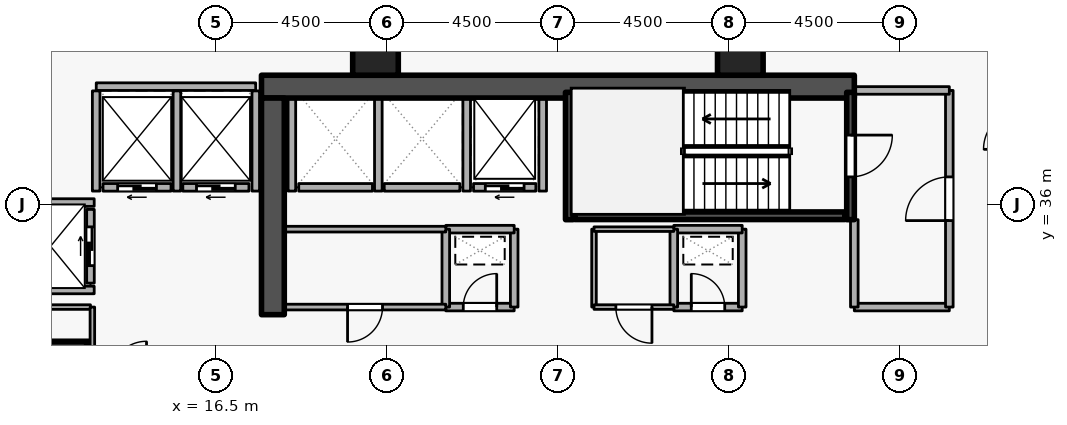
"""IFC4 building model, lengths in metres.
Left out: names, types, materials, properties, quantities, classifications, styles, units other than length and angle.
Written with IfcOpenShell. Run it as: python <this file> out.ifc"""

import sys

from ifc_helpers import new_model, si_unit, direction, frame, frame_2d, origin, origin_2d, place, context, subcontext, project, spatial, rectangle, extrude, element, fill, save


model = new_model("IFC4")
c1 = context("Model", 3, precision=1e-05, world=origin(), true_north=direction((0.0, 1.0)))
c2 = subcontext(c1, "Body", "Model", "MODEL_VIEW")
j1 = project(units=[si_unit("LENGTHUNIT", "METRE"), si_unit("PLANEANGLEUNIT", "RADIAN")], contexts=[c1])
p1 = place(None, origin())
s1 = spatial("IfcSite", under=j1, at=p1, CompositionType="ELEMENT")
p2 = place(p1, origin())
s2 = spatial("IfcBuilding", under=s1, at=p2, CompositionType="ELEMENT")
p3 = place(p2, frame((0.0, 0.0, 90.9)))
s3 = spatial("IfcBuildingStorey", under=s2, at=p3, CompositionType="ELEMENT", Elevation=90.9)
p4 = place(p3, frame((17.7, 39.1, 0.0), z_axis=(0.0, 0.0, 1.0), x_axis=(1.0, 0.0, 0.0)))
e1 = element("IfcWall", 1, at=p4, inside=s3, PredefinedType="SHEAR", context=c2, shape_type="SweptSolid", body=[
    extrude(rectangle(XDim=15.6, YDim=0.6, at=frame_2d((7.8, 0.0))), origin(), (0.0, 0.0, 1.0), 3.6),
])
p5 = place(p3, frame((18.0, 33.1, 0.0), z_axis=(0.0, 0.0, 1.0), x_axis=(0.0, 1.0, 0.0)))
e2 = element("IfcWall", 2, at=p5, inside=s3, PredefinedType="SHEAR", context=c2, shape_type="SweptSolid", body=[
    extrude(rectangle(XDim=5.7, YDim=0.6, at=frame_2d((2.85, 0.0))), origin(), (0.0, 0.0, 1.0), 3.6),
])
for number, where, z_axis, x_axis in (
    (3, (12.5, 31.8, 0.0), (0.0, 0.0, 1.0), (1.0, 0.0, 0.0)),
    (4, (20.7, 40.0, 0.0), (0.0, 0.0, 1.0), (1.0, 0.0, 0.0)),
    (5, (30.3, 40.0, 0.0), (0.0, 0.0, 1.0), (1.0, 0.0, 0.0)),
):
    element("IfcColumn", number, at=place(p3, frame(where, z_axis=z_axis, x_axis=x_axis)), inside=s3, PredefinedType="COLUMN", context=c2, shape_type="SweptSolid", body=[
        extrude(rectangle(XDim=1.2, YDim=1.2, at=origin_2d()), origin(), (0.0, 0.0, 1.0), 3.6),
    ])
p6 = place(p3, frame((24.92, 36.45, 0.0), z_axis=(0.0, 0.0, 1.0), x_axis=(-1.0, 0.0, 0.0)))
e6 = element("IfcWall", 6, at=p6, inside=s3, PredefinedType="STANDARD", context=c2, shape_type="SweptSolid", body=[
    extrude(rectangle(XDim=1.64, YDim=0.2, at=frame_2d((0.82, 0.0))), origin(), (0.0, 0.0, 1.0), 3.34),
])
p7 = place(p6, frame((0.31, 0.0, 0.0)))
e7 = element("IfcOpeningElement", 7, at=p7, cuts=e6, PredefinedType="OPENING", context=c2, shape_type="SweptSolid", body=[
    extrude(rectangle(XDim=1.02, YDim=2.06, at=frame_2d((0.51, 1.03))), frame((0.0, 0.11, 0.0), z_axis=(0.0, -1.0, 0.0), x_axis=(1.0, 0.0, 0.0)), (0.0, 0.0, 1.0), 0.22),
])
p8 = place(p3, frame((22.92, 36.45, 0.0), z_axis=(0.0, 0.0, 1.0), x_axis=(-1.0, 0.0, 0.0)))
e8 = element("IfcWall", 8, at=p8, inside=s3, PredefinedType="STANDARD", context=c2, shape_type="SweptSolid", body=[
    extrude(rectangle(XDim=1.99, YDim=0.2, at=frame_2d((0.995, 0.0))), origin(), (0.0, 0.0, 1.0), 3.34),
])
p9 = place(p3, frame((20.62, 36.45, 0.0), z_axis=(0.0, 0.0, 1.0), x_axis=(-1.0, 0.0, 0.0)))
e9 = element("IfcWall", 9, at=p9, inside=s3, PredefinedType="STANDARD", context=c2, shape_type="SweptSolid", body=[
    extrude(rectangle(XDim=1.94, YDim=0.2, at=frame_2d((0.97, 0.0))), origin(), (0.0, 0.0, 1.0), 3.34),
])
p10 = place(p3, frame((17.37, 36.45, 0.0), z_axis=(0.0, 0.0, 1.0), x_axis=(-1.0, 0.0, 0.0)))
e10 = element("IfcWall", 10, at=p10, inside=s3, PredefinedType="STANDARD", context=c2, shape_type="SweptSolid", body=[
    extrude(rectangle(XDim=1.74, YDim=0.2, at=frame_2d((0.87, 0.0))), origin(), (0.0, 0.0, 1.0), 3.34),
])
p11 = place(p10, frame((0.36, 0.0, 0.0)))
e11 = element("IfcOpeningElement", 11, at=p11, cuts=e10, PredefinedType="OPENING", context=c2, shape_type="SweptSolid", body=[
    extrude(rectangle(XDim=1.02, YDim=2.06, at=frame_2d((0.51, 1.03))), frame((0.0, 0.11, 0.0), z_axis=(0.0, -1.0, 0.0), x_axis=(1.0, 0.0, 0.0)), (0.0, 0.0, 1.0), 0.22),
])
p12 = place(p3, frame((15.32, 36.45, 0.0), z_axis=(0.0, 0.0, 1.0), x_axis=(-1.0, 0.0, 0.0)))
e12 = element("IfcWall", 12, at=p12, inside=s3, PredefinedType="STANDARD", context=c2, shape_type="SweptSolid", body=[
    extrude(rectangle(XDim=1.79, YDim=0.2, at=frame_2d((0.895, 0.0))), origin(), (0.0, 0.0, 1.0), 3.34),
])
p13 = place(p12, frame((0.385, 0.0, 0.0)))
e13 = element("IfcOpeningElement", 13, at=p13, cuts=e12, PredefinedType="OPENING", context=c2, shape_type="SweptSolid", body=[
    extrude(rectangle(XDim=1.02, YDim=2.06, at=frame_2d((0.51, 1.03))), frame((0.0, 0.11, 0.0), z_axis=(0.0, -1.0, 0.0), x_axis=(1.0, 0.0, 0.0)), (0.0, 0.0, 1.0), 0.22),
])
p14 = place(p3, frame((13.2, 33.93, 0.0), z_axis=(0.0, 0.0, 1.0), x_axis=(0.0, 1.0, 0.0)))
e14 = element("IfcWall", 14, at=p14, inside=s3, PredefinedType="STANDARD", context=c2, shape_type="SweptSolid", body=[
    extrude(rectangle(XDim=1.94, YDim=0.2, at=frame_2d((0.97, 0.0))), origin(), (0.0, 0.0, 1.0), 3.34),
])
p15 = place(p14, frame((0.46, 0.0, 0.0)))
e15 = element("IfcOpeningElement", 15, at=p15, cuts=e14, PredefinedType="OPENING", context=c2, shape_type="SweptSolid", body=[
    extrude(rectangle(XDim=1.02, YDim=2.06, at=frame_2d((0.51, 1.03))), frame((0.0, 0.11, 0.0), z_axis=(0.0, -1.0, 0.0), x_axis=(1.0, 0.0, 0.0)), (0.0, 0.0, 1.0), 0.22),
])
for number, where, z_axis, x_axis in (
    (16, (25.1, 36.352, 0.0), (0.0, 0.0, 1.0), (0.0, 1.0, 0.0)),
    (17, (23.1, 36.352, 0.0), (0.0, 0.0, 1.0), (0.0, 1.0, 0.0)),
    (18, (20.775, 36.352, 0.0), (0.0, 0.0, 1.0), (0.0, 1.0, 0.0)),
    (19, (18.5, 36.352, 0.0), (0.0, 0.0, 1.0), (0.0, 1.0, 0.0)),
):
    element("IfcWall", number, at=place(p3, frame(where, z_axis=z_axis, x_axis=x_axis)), inside=s3, PredefinedType="STANDARD", context=c2, shape_type="SweptSolid", body=[
        extrude(rectangle(XDim=2.436, YDim=0.2, at=frame_2d((1.218, 0.0))), origin(), (0.0, 0.0, 1.0), 3.34),
    ])
p16 = place(p3, frame((13.352, 39.1, 0.0), z_axis=(0.0, 0.0, 1.0), x_axis=(1.0, 0.0, 0.0)))
e20 = element("IfcWall", 20, at=p16, inside=s3, PredefinedType="STANDARD", context=c2, shape_type="SweptSolid", body=[
    extrude(rectangle(XDim=4.196, YDim=0.2, at=frame_2d((2.098, 0.0))), origin(), (0.0, 0.0, 1.0), 3.34),
])
p17 = place(p3, frame((17.55, 36.352, 0.0), z_axis=(0.0, 0.0, 1.0), x_axis=(0.0, 1.0, 0.0)))
e21 = element("IfcWall", 21, at=p17, inside=s3, PredefinedType="STANDARD", context=c2, shape_type="SweptSolid", body=[
    extrude(rectangle(XDim=2.636, YDim=0.2, at=frame_2d((1.318, 0.0))), origin(), (0.0, 0.0, 1.0), 2.545),
])
for number, where, z_axis, x_axis in (
    (22, (15.475, 36.352, 0.0), (0.0, 0.0, 1.0), (0.0, 1.0, 0.0)),
    (23, (13.35, 36.352, 0.0), (0.0, 0.0, 1.0), (0.0, 1.0, 0.0)),
):
    element("IfcWall", number, at=place(p3, frame(where, z_axis=z_axis, x_axis=x_axis)), inside=s3, PredefinedType="STANDARD", context=c2, shape_type="SweptSolid", body=[
        extrude(rectangle(XDim=2.636, YDim=0.2, at=frame_2d((1.318, 0.0))), origin(), (0.0, 0.0, 1.0), 3.34),
    ])
for number, where, z_axis, x_axis in (
    (24, (11.002, 36.05, 0.0), (0.0, 0.0, 1.0), (1.0, 0.0, 0.0)),
    (25, (11.002, 33.75, 0.0), (0.0, 0.0, 1.0), (1.0, 0.0, 0.0)),
):
    element("IfcWall", number, at=place(p3, frame(where, z_axis=z_axis, x_axis=x_axis)), inside=s3, PredefinedType="STANDARD", context=c2, shape_type="SweptSolid", body=[
        extrude(rectangle(XDim=2.296, YDim=0.2, at=frame_2d((1.148, 0.0))), origin(), (0.0, 0.0, 1.0), 3.34),
    ])
p18 = place(p3, frame((33.2, 38.95, 0.0), z_axis=(0.0, 0.0, 1.0), x_axis=(0.0, -1.0, 0.0)))
e26 = element("IfcWall", 26, at=p18, inside=s3, PredefinedType="SHEAR", context=c2, shape_type="SweptSolid", body=[
    extrude(rectangle(XDim=3.35, YDim=0.2, at=frame_2d((1.675, 0.0))), origin(), (0.0, 0.0, 1.0), 3.6),
])
p19 = place(p18, frame((1.125, 0.0, 0.0)))
e27 = element("IfcOpeningElement", 27, at=p19, cuts=e26, PredefinedType="OPENING", context=c2, shape_type="SweptSolid", body=[
    extrude(rectangle(XDim=1.1, YDim=2.1, at=frame_2d((0.55, 1.05))), frame((0.0, 0.11, 0.0), z_axis=(0.0, -1.0, 0.0), x_axis=(1.0, 0.0, 0.0)), (0.0, 0.0, 1.0), 0.22),
])
p20 = place(p3, frame((25.8, 35.6, 0.0), z_axis=(0.0, 0.0, 1.0), x_axis=(0.0, 1.0, 0.0)))
e28 = element("IfcWall", 28, at=p20, inside=s3, PredefinedType="SHEAR", context=c2, shape_type="SweptSolid", body=[
    extrude(rectangle(XDim=3.35, YDim=0.2, at=frame_2d((1.675, 0.0))), origin(), (0.0, 0.0, 1.0), 3.6),
])
p21 = place(p3, frame((25.95, 35.703, 0.0), z_axis=(0.0, 0.0, 1.0), x_axis=(1.0, 0.0, 0.0)))
e29 = element("IfcWall", 29, at=p21, inside=s3, PredefinedType="SHEAR", context=c2, shape_type="SweptSolid", body=[
    extrude(rectangle(XDim=7.1, YDim=0.2, at=frame_2d((3.55, 0.0))), origin(), (0.0, 0.0, 1.0), 3.6),
])
p22 = place(p3, frame((33.3, 33.3, 0.0), z_axis=(0.0, 0.0, 1.0), x_axis=(1.0, 0.0, 0.0)))
e30 = element("IfcWall", 30, at=p22, inside=s3, PredefinedType="STANDARD", context=c2, shape_type="SweptSolid", body=[
    extrude(rectangle(XDim=2.5, YDim=0.2, at=frame_2d((1.25, 0.0))), origin(), (0.0, 0.0, 1.0), 3.34),
])
p23 = place(p3, frame((35.8, 33.3, 0.0), z_axis=(0.0, 0.0, 1.0), x_axis=(0.0, 1.0, 0.0)))
e31 = element("IfcWall", 31, at=p23, inside=s3, PredefinedType="STANDARD", context=c2, shape_type="SweptSolid", body=[
    extrude(rectangle(XDim=5.7, YDim=0.2, at=frame_2d((2.85, 0.0))), origin(), (0.0, 0.0, 1.0), 3.34),
])
p24 = place(p23, frame((2.275, 0.0, 0.0)))
e32 = element("IfcOpeningElement", 32, at=p24, cuts=e31, PredefinedType="OPENING", context=c2, shape_type="SweptSolid", body=[
    extrude(rectangle(XDim=1.15, YDim=2.1, at=frame_2d((0.575, 1.05))), frame((0.0, 0.11, 0.0), z_axis=(0.0, -1.0, 0.0), x_axis=(1.0, 0.0, 0.0)), (0.0, 0.0, 1.0), 0.22),
])
p25 = place(p3, frame((35.8, 39.0, 0.0), z_axis=(0.0, 0.0, 1.0), x_axis=(-1.0, 0.0, 0.0)))
e33 = element("IfcWall", 33, at=p25, inside=s3, PredefinedType="STANDARD", context=c2, shape_type="SweptSolid", body=[
    extrude(rectangle(XDim=2.5, YDim=0.2, at=frame_2d((1.25, 0.0))), origin(), (0.0, 0.0, 1.0), 3.34),
])
p26 = place(p3, frame((33.3, 35.6, 0.0), z_axis=(0.0, 0.0, 1.0), x_axis=(0.0, -1.0, 0.0)))
e34 = element("IfcWall", 34, at=p26, inside=s3, PredefinedType="STANDARD", context=c2, shape_type="SweptSolid", body=[
    extrude(rectangle(XDim=2.3, YDim=0.2, at=frame_2d((1.15, 0.0))), origin(), (0.0, 0.0, 1.0), 2.545),
])
p27 = place(p3, frame((22.55, 33.3, 0.0), z_axis=(0.0, 0.0, 1.0), x_axis=(1.0, 0.0, 0.0)))
e35 = element("IfcWall", 35, at=p27, inside=s3, PredefinedType="STANDARD", context=c2, shape_type="SweptSolid", body=[
    extrude(rectangle(XDim=1.8, YDim=0.2, at=frame_2d((0.9, 0.0))), origin(), (0.0, 0.0, 1.0), 3.34),
])
p28 = place(p27, frame((0.46, 0.0, 0.0)))
e36 = element("IfcOpeningElement", 36, at=p28, cuts=e35, PredefinedType="OPENING", context=c2, shape_type="SweptSolid", body=[
    extrude(rectangle(XDim=0.88, YDim=2.04, at=frame_2d((0.44, 1.02))), frame((0.0, 0.11, 0.0), z_axis=(0.0, -1.0, 0.0), x_axis=(1.0, 0.0, 0.0)), (0.0, 0.0, 1.0), 0.22),
])
p29 = place(p3, frame((24.35, 33.3, 0.0), z_axis=(0.0, 0.0, 1.0), x_axis=(0.0, 1.0, 0.0)))
e37 = element("IfcWall", 37, at=p29, inside=s3, PredefinedType="STANDARD", context=c2, shape_type="SweptSolid", body=[
    extrude(rectangle(XDim=2.05, YDim=0.2, at=frame_2d((1.025, 0.0))), origin(), (0.0, 0.0, 1.0), 3.34),
])
p30 = place(p3, frame((24.35, 35.35, 0.0), z_axis=(0.0, 0.0, 1.0), x_axis=(-1.0, 0.0, 0.0)))
e38 = element("IfcWall", 38, at=p30, inside=s3, PredefinedType="STANDARD", context=c2, shape_type="SweptSolid", body=[
    extrude(rectangle(XDim=1.8, YDim=0.2, at=frame_2d((0.9, 0.0))), origin(), (0.0, 0.0, 1.0), 3.34),
])
p31 = place(p3, frame((22.55, 35.35, 0.0), z_axis=(0.0, 0.0, 1.0), x_axis=(0.0, -1.0, 0.0)))
e39 = element("IfcWall", 39, at=p31, inside=s3, PredefinedType="STANDARD", context=c2, shape_type="SweptSolid", body=[
    extrude(rectangle(XDim=2.05, YDim=0.2, at=frame_2d((1.025, 0.0))), origin(), (0.0, 0.0, 1.0), 3.34),
])
p32 = place(p3, frame((28.55, 33.3, 0.0), z_axis=(0.0, 0.0, 1.0), x_axis=(1.0, 0.0, 0.0)))
e40 = element("IfcWall", 40, at=p32, inside=s3, PredefinedType="STANDARD", context=c2, shape_type="SweptSolid", body=[
    extrude(rectangle(XDim=1.8, YDim=0.2, at=frame_2d((0.9, 0.0))), origin(), (0.0, 0.0, 1.0), 3.34),
])
p33 = place(p32, frame((0.46, 0.0, 0.0)))
e41 = element("IfcOpeningElement", 41, at=p33, cuts=e40, PredefinedType="OPENING", context=c2, shape_type="SweptSolid", body=[
    extrude(rectangle(XDim=0.88, YDim=2.04, at=frame_2d((0.44, 1.02))), frame((0.0, 0.11, 0.0), z_axis=(0.0, -1.0, 0.0), x_axis=(1.0, 0.0, 0.0)), (0.0, 0.0, 1.0), 0.22),
])
p34 = place(p3, frame((30.35, 33.3, 0.0), z_axis=(0.0, 0.0, 1.0), x_axis=(0.0, 1.0, 0.0)))
e42 = element("IfcWall", 42, at=p34, inside=s3, PredefinedType="STANDARD", context=c2, shape_type="SweptSolid", body=[
    extrude(rectangle(XDim=2.05, YDim=0.2, at=frame_2d((1.025, 0.0))), origin(), (0.0, 0.0, 1.0), 3.34),
])
p35 = place(p3, frame((30.35, 35.35, 0.0), z_axis=(0.0, 0.0, 1.0), x_axis=(-1.0, 0.0, 0.0)))
e43 = element("IfcWall", 43, at=p35, inside=s3, PredefinedType="STANDARD", context=c2, shape_type="SweptSolid", body=[
    extrude(rectangle(XDim=1.8, YDim=0.2, at=frame_2d((0.9, 0.0))), origin(), (0.0, 0.0, 1.0), 3.34),
])
p36 = place(p3, frame((28.55, 35.35, 0.0), z_axis=(0.0, 0.0, 1.0), x_axis=(0.0, -1.0, 0.0)))
e44 = element("IfcWall", 44, at=p36, inside=s3, PredefinedType="STANDARD", context=c2, shape_type="SweptSolid", body=[
    extrude(rectangle(XDim=2.05, YDim=0.2, at=frame_2d((1.025, 0.0))), origin(), (0.0, 0.0, 1.0), 3.34),
])
p37 = place(p3, frame((18.3, 35.35, 0.0), z_axis=(0.0, 0.0, 1.0), x_axis=(1.0, 0.0, 0.0)))
e45 = element("IfcWall", 45, at=p37, inside=s3, PredefinedType="PARTITIONING", context=c2, shape_type="SweptSolid", body=[
    extrude(rectangle(XDim=4.25, YDim=0.15, at=frame_2d((2.125, 0.0))), origin(), (0.0, 0.0, 1.0), 3.34),
])
p38 = place(p3, frame((22.55, 33.3, 0.0), z_axis=(0.0, 0.0, 1.0), x_axis=(-1.0, 0.0, 0.0)))
e46 = element("IfcWall", 46, at=p38, inside=s3, PredefinedType="PARTITIONING", context=c2, shape_type="SweptSolid", body=[
    extrude(rectangle(XDim=4.25, YDim=0.15, at=frame_2d((2.125, 0.0))), origin(), (0.0, 0.0, 1.0), 3.34),
])
p39 = place(p38, frame((1.665, 0.0, 0.0)))
e47 = element("IfcOpeningElement", 47, at=p39, cuts=e46, PredefinedType="OPENING", context=c2, shape_type="SweptSolid", body=[
    extrude(rectangle(XDim=0.92, YDim=2.08, at=frame_2d((0.46, 1.04))), frame((0.0, 0.085, 0.0), z_axis=(0.0, -1.0, 0.0), x_axis=(1.0, 0.0, 0.0)), (0.0, 0.0, 1.0), 0.17),
])
p40 = place(p3, frame((26.45, 33.3, 0.0), z_axis=(0.0, 0.0, 1.0), x_axis=(0.0, 1.0, 0.0)))
e48 = element("IfcWall", 48, at=p40, inside=s3, PredefinedType="PARTITIONING", context=c2, shape_type="SweptSolid", body=[
    extrude(rectangle(XDim=2.05, YDim=0.12, at=frame_2d((1.025, 0.0))), origin(), (0.0, 0.0, 1.0), 3.34),
])
p41 = place(p3, frame((26.45, 35.35, 0.0), z_axis=(0.0, 0.0, 1.0), x_axis=(1.0, 0.0, 0.0)))
e49 = element("IfcWall", 49, at=p41, inside=s3, PredefinedType="PARTITIONING", context=c2, shape_type="SweptSolid", body=[
    extrude(rectangle(XDim=2.1, YDim=0.12, at=frame_2d((1.05, 0.0))), origin(), (0.0, 0.0, 1.0), 3.34),
])
p42 = place(p3, frame((28.55, 33.3, 0.0), z_axis=(0.0, 0.0, 1.0), x_axis=(-1.0, 0.0, 0.0)))
e50 = element("IfcWall", 50, at=p42, inside=s3, PredefinedType="PARTITIONING", context=c2, shape_type="SweptSolid", body=[
    extrude(rectangle(XDim=2.1, YDim=0.12, at=frame_2d((1.05, 0.0))), origin(), (0.0, 0.0, 1.0), 3.34),
])
p43 = place(p42, frame((0.575, 0.0, 0.0)))
e51 = element("IfcOpeningElement", 51, at=p43, cuts=e50, PredefinedType="OPENING", context=c2, shape_type="SweptSolid", body=[
    extrude(rectangle(XDim=0.95, YDim=2.1, at=frame_2d((0.475, 1.05))), frame((0.0, 0.07, 0.0), z_axis=(0.0, -1.0, 0.0), x_axis=(1.0, 0.0, 0.0)), (0.0, 0.0, 1.0), 0.14),
])
p44 = place(p3, frame((10.9, 33.3, 0.0), z_axis=(0.0, 0.0, 1.0), x_axis=(1.0, 0.0, 0.0)))
e52 = element("IfcWall", 52, at=p44, inside=s3, PredefinedType="PARTITIONING", context=c2, shape_type="SweptSolid", body=[
    extrude(rectangle(XDim=2.3, YDim=0.12, at=frame_2d((1.15, 0.0))), origin(), (0.0, 0.0, 1.0), 3.34),
])
p45 = place(p3, frame((13.25, 33.3, 0.0), z_axis=(0.0, 0.0, 1.0), x_axis=(0.0, -1.0, 0.0)))
e53 = element("IfcWall", 53, at=p45, inside=s3, PredefinedType="PARTITIONING", context=c2, shape_type="SweptSolid", body=[
    extrude(rectangle(XDim=1.85, YDim=0.12, at=frame_2d((0.925, 0.0))), origin(), (0.0, 0.0, 1.0), 3.34),
])
p46 = place(p7, origin())
e54 = element("IfcDoor", 54, at=p46, inside=s3, OperationType="SLIDING_TO_LEFT", PredefinedType="DOOR", context=c2, shape_type="SweptSolid", body=[
    extrude(rectangle(XDim=1.02, YDim=2.06, at=frame_2d((0.51, 1.03))), frame((0.0, 0.025, 0.0), z_axis=(0.0, -1.0, 0.0), x_axis=(1.0, 0.0, 0.0)), (0.0, 0.0, 1.0), 0.05),
])
fill(e7, e54)
p47 = place(p11, origin())
e55 = element("IfcDoor", 55, at=p47, inside=s3, OperationType="SLIDING_TO_LEFT", PredefinedType="DOOR", context=c2, shape_type="SweptSolid", body=[
    extrude(rectangle(XDim=1.02, YDim=2.06, at=frame_2d((0.51, 1.03))), frame((0.0, 0.025, 0.0), z_axis=(0.0, -1.0, 0.0), x_axis=(1.0, 0.0, 0.0)), (0.0, 0.0, 1.0), 0.05),
])
fill(e11, e55)
p48 = place(p13, origin())
e56 = element("IfcDoor", 56, at=p48, inside=s3, OperationType="SLIDING_TO_LEFT", PredefinedType="DOOR", context=c2, shape_type="SweptSolid", body=[
    extrude(rectangle(XDim=1.02, YDim=2.06, at=frame_2d((0.51, 1.03))), frame((0.0, 0.025, 0.0), z_axis=(0.0, -1.0, 0.0), x_axis=(1.0, 0.0, 0.0)), (0.0, 0.0, 1.0), 0.05),
])
fill(e13, e56)
p49 = place(p15, origin())
e57 = element("IfcDoor", 57, at=p49, inside=s3, OperationType="SLIDING_TO_LEFT", PredefinedType="DOOR", context=c2, shape_type="SweptSolid", body=[
    extrude(rectangle(XDim=1.02, YDim=2.06, at=frame_2d((0.51, 1.03))), frame((0.0, 0.025, 0.0), z_axis=(0.0, -1.0, 0.0), x_axis=(1.0, 0.0, 0.0)), (0.0, 0.0, 1.0), 0.05),
])
fill(e15, e57)
p50 = place(p19, origin())
e58 = element("IfcDoor", 58, at=p50, inside=s3, OperationType="SINGLE_SWING_LEFT", PredefinedType="DOOR", context=c2, shape_type="SweptSolid", body=[
    extrude(rectangle(XDim=1.1, YDim=2.1, at=frame_2d((0.55, 1.05))), frame((0.0, 0.025, 0.0), z_axis=(0.0, -1.0, 0.0), x_axis=(1.0, 0.0, 0.0)), (0.0, 0.0, 1.0), 0.05),
])
fill(e27, e58)
p51 = place(p24, origin())
e59 = element("IfcDoor", 59, at=p51, inside=s3, OperationType="SINGLE_SWING_LEFT", PredefinedType="DOOR", context=c2, shape_type="SweptSolid", body=[
    extrude(rectangle(XDim=1.15, YDim=2.1, at=frame_2d((0.575, 1.05))), frame((0.0, 0.025, 0.0), z_axis=(0.0, -1.0, 0.0), x_axis=(1.0, 0.0, 0.0)), (0.0, 0.0, 1.0), 0.05),
])
fill(e32, e59)
p52 = place(p28, origin())
e60 = element("IfcDoor", 60, at=p52, inside=s3, OperationType="SINGLE_SWING_RIGHT", PredefinedType="DOOR", context=c2, shape_type="SweptSolid", body=[
    extrude(rectangle(XDim=0.88, YDim=2.04, at=frame_2d((0.44, 1.02))), frame((0.0, 0.025, 0.0), z_axis=(0.0, -1.0, 0.0), x_axis=(1.0, 0.0, 0.0)), (0.0, 0.0, 1.0), 0.05),
])
fill(e36, e60)
p53 = place(p33, origin())
e61 = element("IfcDoor", 61, at=p53, inside=s3, OperationType="SINGLE_SWING_LEFT", PredefinedType="DOOR", context=c2, shape_type="SweptSolid", body=[
    extrude(rectangle(XDim=0.88, YDim=2.04, at=frame_2d((0.44, 1.02))), frame((0.0, 0.025, 0.0), z_axis=(0.0, -1.0, 0.0), x_axis=(1.0, 0.0, 0.0)), (0.0, 0.0, 1.0), 0.05),
])
fill(e41, e61)
p54 = place(p39, origin())
e62 = element("IfcDoor", 62, at=p54, inside=s3, OperationType="SINGLE_SWING_RIGHT", PredefinedType="DOOR", context=c2, shape_type="SweptSolid", body=[
    extrude(rectangle(XDim=0.92, YDim=2.08, at=frame_2d((0.46, 1.04))), frame((0.0, 0.025, 0.0), z_axis=(0.0, -1.0, 0.0), x_axis=(1.0, 0.0, 0.0)), (0.0, 0.0, 1.0), 0.05),
])
fill(e47, e62)
p55 = place(p43, origin())
e63 = element("IfcDoor", 63, at=p55, inside=s3, OperationType="SINGLE_SWING_LEFT", PredefinedType="DOOR", context=c2, shape_type="SweptSolid", body=[
    extrude(rectangle(XDim=0.95, YDim=2.1, at=frame_2d((0.475, 1.05))), frame((0.0, 0.025, 0.0), z_axis=(0.0, -1.0, 0.0), x_axis=(1.0, 0.0, 0.0)), (0.0, 0.0, 1.0), 0.05),
])
fill(e51, e63)
save(model, sys.argv[1])
